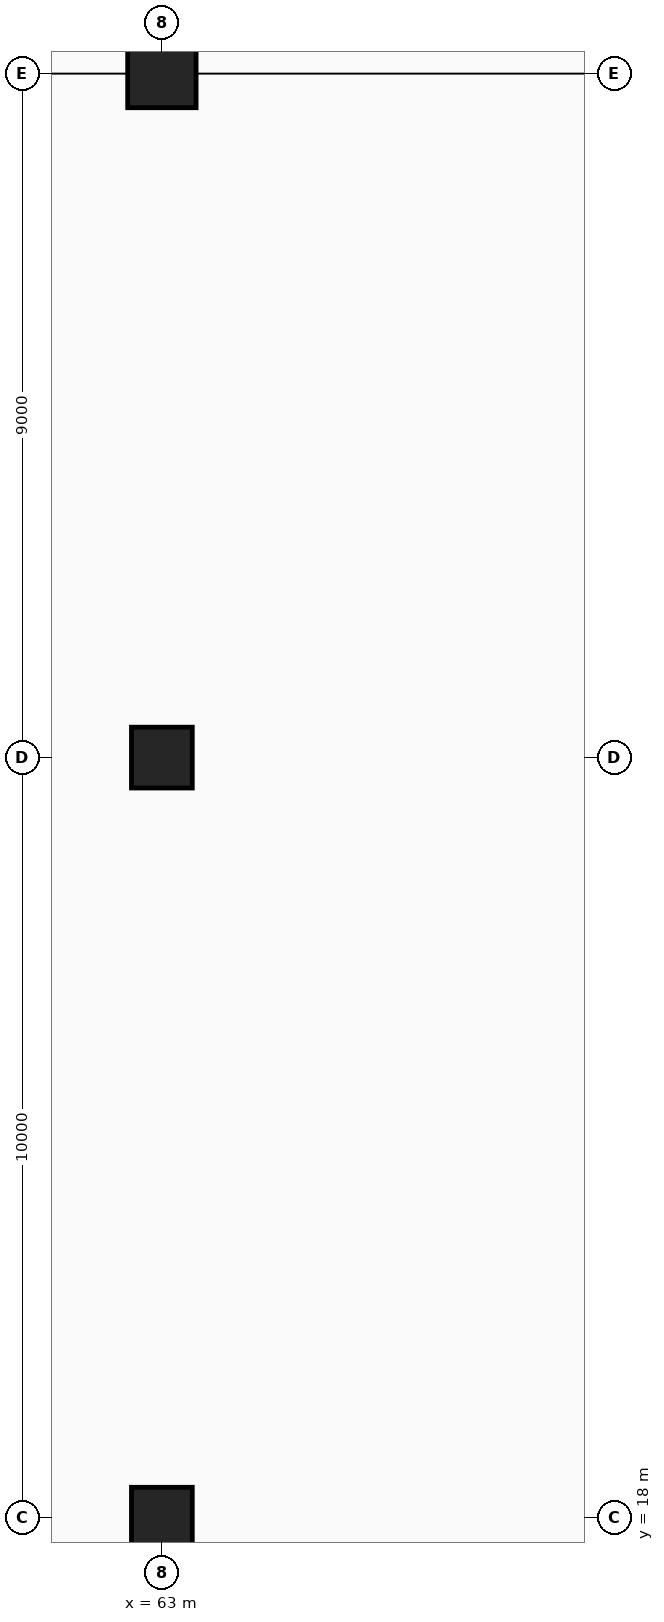
"""IFC4 building model, lengths in metres.
Left out: names, types, materials, properties, quantities, classifications, styles, units other than length and angle.
Written with IfcOpenShell. Run it as: python <this file> out.ifc"""

import sys

from ifc_helpers import new_model, si_unit, direction, frame, origin, origin_2d, place, context, subcontext, project, spatial, rectangle, extrude, element, save


model = new_model("IFC4")
c1 = context("Model", 3, precision=1e-05, world=origin(), true_north=direction((0.0, 1.0)))
c2 = subcontext(c1, "Body", "Model", "MODEL_VIEW")
j1 = project(units=[si_unit("LENGTHUNIT", "METRE"), si_unit("PLANEANGLEUNIT", "RADIAN")], contexts=[c1])
p1 = place(None, origin())
s1 = spatial("IfcSite", under=j1, at=p1, CompositionType="ELEMENT")
p2 = place(p1, origin())
s2 = spatial("IfcBuilding", under=s1, at=p2, CompositionType="ELEMENT")
p3 = place(p2, frame((0.0, 0.0, -5.1)))
s3 = spatial("IfcBuildingStorey", under=s2, at=p3, CompositionType="ELEMENT", Elevation=-5.1)
for number, where, z_axis, x_axis in (
    (1, (63.0, 18.0, 0.0), (0.0, 0.0, 1.0), (1.0, 0.0, 0.0)),
    (2, (63.0, 28.0, 0.0), (0.0, 0.0, 1.0), (1.0, 0.0, 0.0)),
):
    element("IfcColumn", number, at=place(p3, frame(where, z_axis=z_axis, x_axis=x_axis)), inside=s3, PredefinedType="COLUMN", context=c2, shape_type="SweptSolid", body=[
        extrude(rectangle(XDim=0.8, YDim=0.8, at=origin_2d()), origin(), (0.0, 0.0, 1.0), 5.1),
    ])
p4 = place(p3, frame((63.0, 37.0, 0.0), z_axis=(0.0, 0.0, 1.0), x_axis=(1.0, 0.0, 0.0)))
e3 = element("IfcColumn", 3, at=p4, inside=s3, PredefinedType="COLUMN", context=c2, shape_type="SweptSolid", body=[
    extrude(rectangle(XDim=0.9, YDim=0.9, at=origin_2d()), origin(), (0.0, 0.0, 1.0), 5.1),
])
save(model, sys.argv[1])
